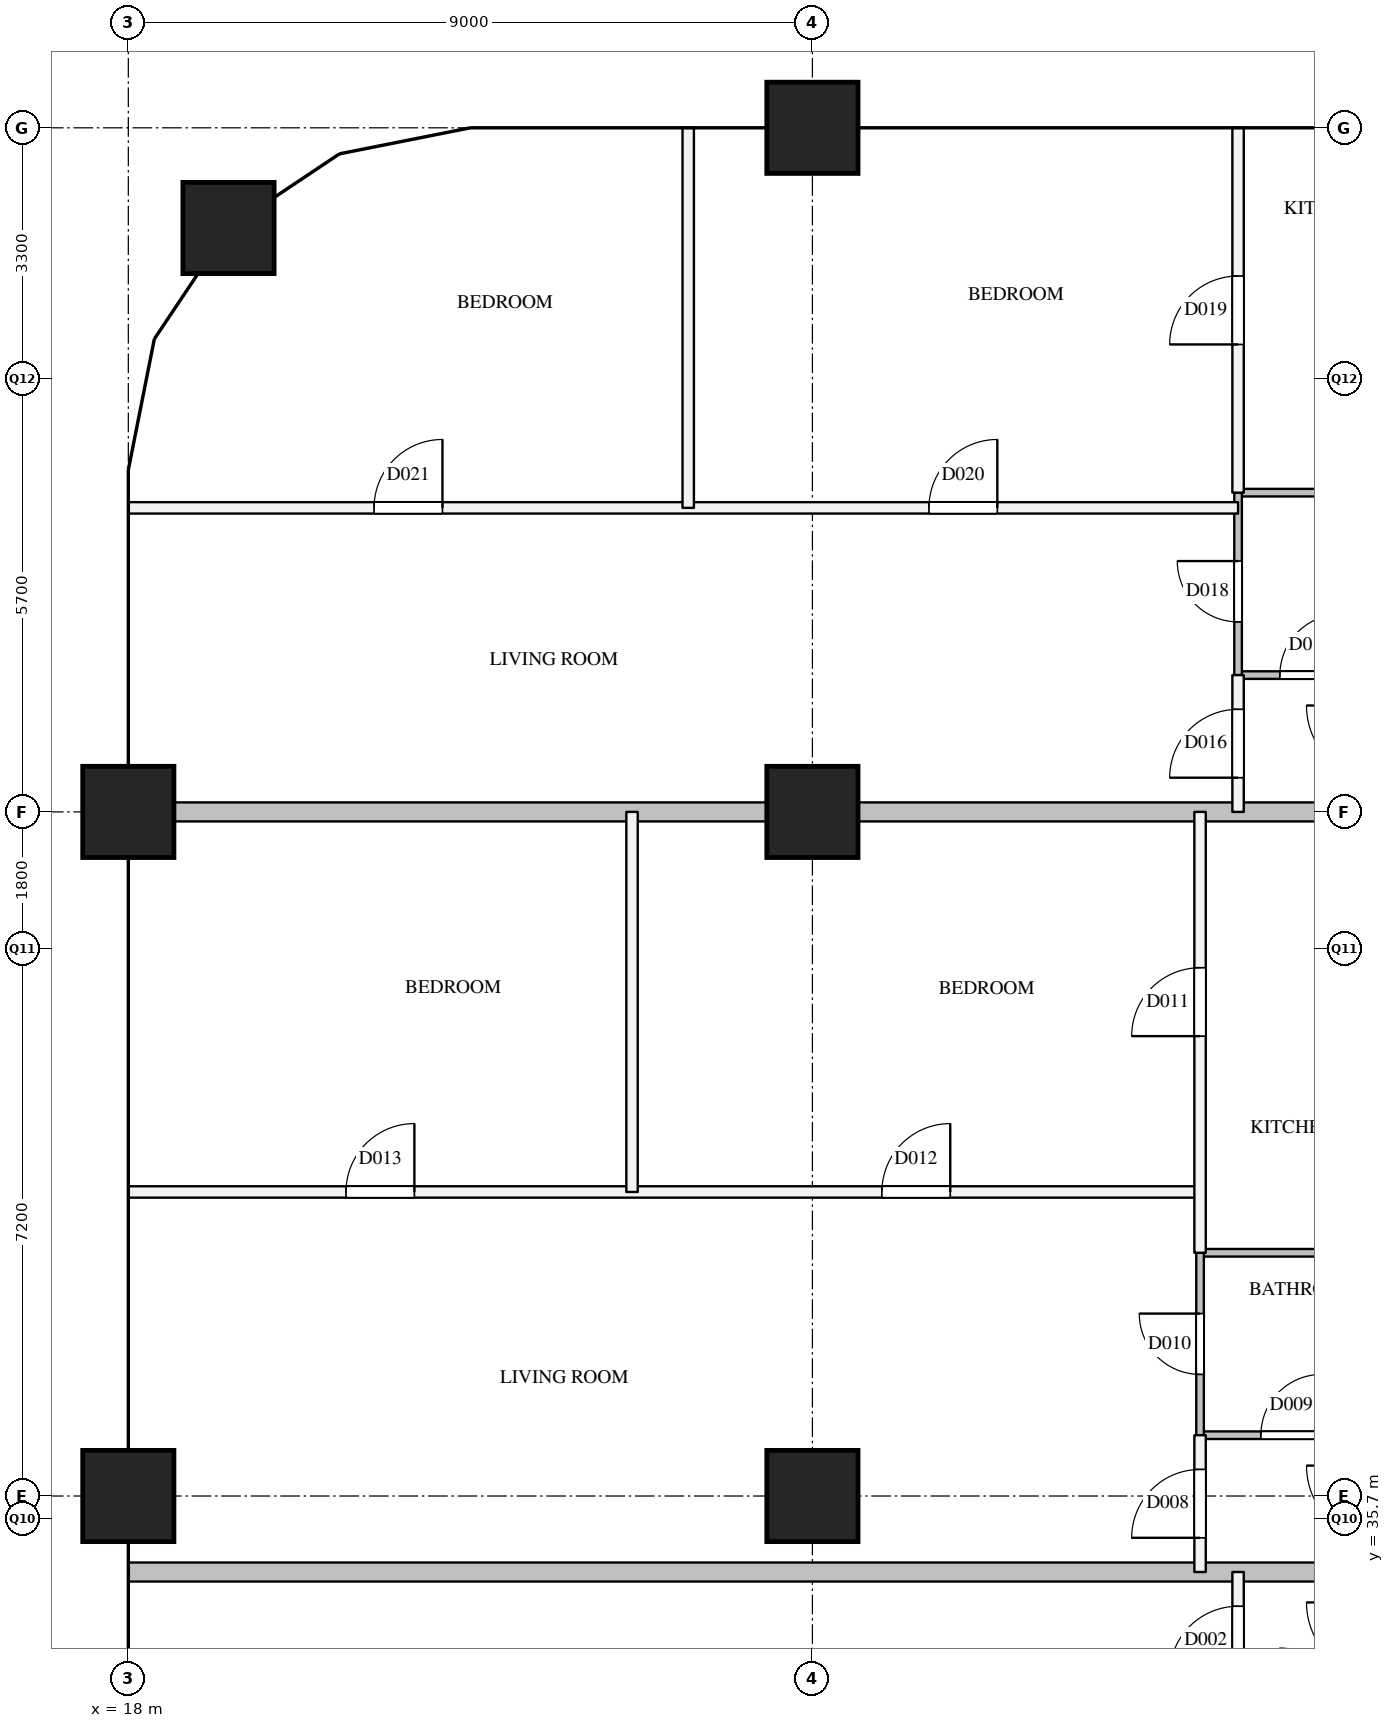
"""IFC4 building model, lengths in metres.
Left out: names, types, materials, properties, quantities, classifications, styles, units other than length and angle.
Written with IfcOpenShell. Run it as: python <this file> out.ifc"""

import sys

from ifc_helpers import new_model, si_unit, direction, frame, frame_2d, origin, origin_2d, place, context, subcontext, project, spatial, rectangle, extrude, element, fill, save


model = new_model("IFC4")
c1 = context("Model", 3, precision=1e-05, world=origin(), true_north=direction((0.0, 1.0)))
c2 = subcontext(c1, "Body", "Model", "MODEL_VIEW")
j1 = project(units=[si_unit("LENGTHUNIT", "METRE"), si_unit("PLANEANGLEUNIT", "RADIAN")], contexts=[c1])
p1 = place(None, origin())
s1 = spatial("IfcSite", under=j1, at=p1, CompositionType="ELEMENT")
p2 = place(p1, origin())
s2 = spatial("IfcBuilding", under=s1, at=p2, CompositionType="ELEMENT")
p3 = place(p2, frame((0.0, 0.0, 242.3)))
s3 = spatial("IfcBuildingStorey", under=s2, at=p3, CompositionType="ELEMENT", Elevation=242.3)
for number, where, z_axis, x_axis in (
    (1, (18.0, 36.0, 0.0), (0.0, 0.0, 1.0), (1.0, 0.0, 0.0)),
    (2, (18.0, 45.0, 0.0), (0.0, 0.0, 1.0), (1.0, 0.0, 0.0)),
    (3, (19.318, 52.682, 0.0), (0.0, 0.0, 1.0), (1.0, 0.0, 0.0)),
    (4, (27.0, 36.0, 0.0), (0.0, 0.0, 1.0), (1.0, 0.0, 0.0)),
    (5, (27.0, 45.0, 0.0), (0.0, 0.0, 1.0), (1.0, 0.0, 0.0)),
    (6, (27.0, 54.0, 0.0), (0.0, 0.0, 1.0), (1.0, 0.0, 0.0)),
):
    element("IfcColumn", number, at=place(p3, frame(where, z_axis=z_axis, x_axis=x_axis)), inside=s3, PredefinedType="COLUMN", context=c2, shape_type="SweptSolid", body=[
        extrude(rectangle(XDim=1.2, YDim=1.2, at=origin_2d()), origin(), (0.0, 0.0, 1.0), 3.9),
    ])
p4 = place(p3, frame((18.0, 40.0, 0.0), z_axis=(0.0, 0.0, 1.0), x_axis=(1.0, 0.0, 0.0)))
e7 = element("IfcWall", 7, at=p4, inside=s3, PredefinedType="PARTITIONING", context=c2, shape_type="SweptSolid", body=[
    extrude(rectangle(XDim=14.1, YDim=0.15, at=frame_2d((7.05, 0.0))), origin(), (0.0, 0.0, 1.0), 2.6),
])
p5 = place(p4, frame((9.914, 0.0, 0.0)))
e8 = element("IfcOpeningElement", 8, at=p5, cuts=e7, PredefinedType="OPENING", context=c2, shape_type="SweptSolid", body=[
    extrude(rectangle(XDim=0.9, YDim=2.1, at=frame_2d((0.45, 1.05))), frame((0.0, 0.085, 0.0), z_axis=(0.0, -1.0, 0.0), x_axis=(1.0, 0.0, 0.0)), (0.0, 0.0, 1.0), 0.17),
])
p6 = place(p4, frame((2.864, 0.0, 0.0)))
e9 = element("IfcOpeningElement", 9, at=p6, cuts=e7, PredefinedType="OPENING", context=c2, shape_type="SweptSolid", body=[
    extrude(rectangle(XDim=0.9, YDim=2.1, at=frame_2d((0.45, 1.05))), frame((0.0, 0.085, 0.0), z_axis=(0.0, -1.0, 0.0), x_axis=(1.0, 0.0, 0.0)), (0.0, 0.0, 1.0), 0.17),
])
p7 = place(p3, frame((18.0, 49.0, 0.0), z_axis=(0.0, 0.0, 1.0), x_axis=(1.0, 0.0, 0.0)))
e10 = element("IfcWall", 10, at=p7, inside=s3, PredefinedType="PARTITIONING", context=c2, shape_type="SweptSolid", body=[
    extrude(rectangle(XDim=14.6, YDim=0.15, at=frame_2d((7.3, 0.0))), origin(), (0.0, 0.0, 1.0), 2.6),
])
p8 = place(p7, frame((10.533, 0.0, 0.0)))
e11 = element("IfcOpeningElement", 11, at=p8, cuts=e10, PredefinedType="OPENING", context=c2, shape_type="SweptSolid", body=[
    extrude(rectangle(XDim=0.9, YDim=2.1, at=frame_2d((0.45, 1.05))), frame((0.0, 0.085, 0.0), z_axis=(0.0, -1.0, 0.0), x_axis=(1.0, 0.0, 0.0)), (0.0, 0.0, 1.0), 0.17),
])
p9 = place(p7, frame((3.233, 0.0, 0.0)))
e12 = element("IfcOpeningElement", 12, at=p9, cuts=e10, PredefinedType="OPENING", context=c2, shape_type="SweptSolid", body=[
    extrude(rectangle(XDim=0.9, YDim=2.1, at=frame_2d((0.45, 1.05))), frame((0.0, 0.085, 0.0), z_axis=(0.0, -1.0, 0.0), x_axis=(1.0, 0.0, 0.0)), (0.0, 0.0, 1.0), 0.17),
])
p10 = place(p3, frame((24.627, 40.0, 0.0), z_axis=(0.0, 0.0, 1.0), x_axis=(0.0, 1.0, 0.0)))
e13 = element("IfcWall", 13, at=p10, inside=s3, PredefinedType="PARTITIONING", context=c2, shape_type="SweptSolid", body=[
    extrude(rectangle(XDim=5.0, YDim=0.15, at=frame_2d((2.5, 0.0))), origin(), (0.0, 0.0, 1.0), 3.6),
])
p11 = place(p3, frame((25.366, 49.0, 0.0), z_axis=(0.0, 0.0, 1.0), x_axis=(0.0, 1.0, 0.0)))
e14 = element("IfcWall", 14, at=p11, inside=s3, PredefinedType="PARTITIONING", context=c2, shape_type="SweptSolid", body=[
    extrude(rectangle(XDim=5.0, YDim=0.15, at=frame_2d((2.5, 0.0))), origin(), (0.0, 0.0, 1.0), 2.6),
])
p12 = place(p3, frame((32.1, 35.0, 0.0), z_axis=(0.0, 0.0, 1.0), x_axis=(0.0, 1.0, 0.0)))
e15 = element("IfcWall", 15, at=p12, inside=s3, PredefinedType="PARTITIONING", context=c2, shape_type="SweptSolid", body=[
    extrude(rectangle(XDim=1.8, YDim=0.15, at=frame_2d((0.9, 0.0))), origin(), (0.0, 0.0, 1.0), 3.6),
])
p13 = place(p12, frame((0.45, 0.0, 0.0)))
e16 = element("IfcOpeningElement", 16, at=p13, cuts=e15, PredefinedType="OPENING", context=c2, shape_type="SweptSolid", body=[
    extrude(rectangle(XDim=0.9, YDim=2.1, at=frame_2d((0.45, 1.05))), frame((0.0, 0.085, 0.0), z_axis=(0.0, -1.0, 0.0), x_axis=(1.0, 0.0, 0.0)), (0.0, 0.0, 1.0), 0.17),
])
p14 = place(p3, frame((32.1, 39.2, 0.0), z_axis=(0.0, 0.0, 1.0), x_axis=(0.0, 1.0, 0.0)))
e17 = element("IfcWall", 17, at=p14, inside=s3, PredefinedType="PARTITIONING", context=c2, shape_type="SweptSolid", body=[
    extrude(rectangle(XDim=5.8, YDim=0.15, at=frame_2d((2.9, 0.0))), origin(), (0.0, 0.0, 1.0), 3.6),
])
p15 = place(p14, frame((2.85, 0.0, 0.0)))
e18 = element("IfcOpeningElement", 18, at=p15, cuts=e17, PredefinedType="OPENING", context=c2, shape_type="SweptSolid", body=[
    extrude(rectangle(XDim=0.9, YDim=2.1, at=frame_2d((0.45, 1.05))), frame((0.0, 0.085, 0.0), z_axis=(0.0, -1.0, 0.0), x_axis=(1.0, 0.0, 0.0)), (0.0, 0.0, 1.0), 0.17),
])
p16 = place(p3, frame((32.6, 33.2, 0.0), z_axis=(0.0, 0.0, 1.0), x_axis=(0.0, 1.0, 0.0)))
e19 = element("IfcWall", 19, at=p16, inside=s3, PredefinedType="PARTITIONING", context=c2, shape_type="SweptSolid", body=[
    extrude(rectangle(XDim=1.8, YDim=0.15, at=frame_2d((0.9, 0.0))), origin(), (0.0, 0.0, 1.0), 3.6),
])
p17 = place(p16, frame((0.45, 0.0, 0.0)))
e20 = element("IfcOpeningElement", 20, at=p17, cuts=e19, PredefinedType="OPENING", context=c2, shape_type="SweptSolid", body=[
    extrude(rectangle(XDim=0.9, YDim=2.1, at=frame_2d((0.45, 1.05))), frame((0.0, 0.085, 0.0), z_axis=(0.0, -1.0, 0.0), x_axis=(1.0, 0.0, 0.0)), (0.0, 0.0, 1.0), 0.17),
])
p18 = place(p3, frame((32.6, 45.0, 0.0), z_axis=(0.0, 0.0, 1.0), x_axis=(0.0, 1.0, 0.0)))
e21 = element("IfcWall", 21, at=p18, inside=s3, PredefinedType="PARTITIONING", context=c2, shape_type="SweptSolid", body=[
    extrude(rectangle(XDim=1.8, YDim=0.15, at=frame_2d((0.9, 0.0))), origin(), (0.0, 0.0, 1.0), 3.6),
])
p19 = place(p18, frame((0.45, 0.0, 0.0)))
e22 = element("IfcOpeningElement", 22, at=p19, cuts=e21, PredefinedType="OPENING", context=c2, shape_type="SweptSolid", body=[
    extrude(rectangle(XDim=0.9, YDim=2.1, at=frame_2d((0.45, 1.05))), frame((0.0, 0.085, 0.0), z_axis=(0.0, -1.0, 0.0), x_axis=(1.0, 0.0, 0.0)), (0.0, 0.0, 1.0), 0.17),
])
p20 = place(p3, frame((32.6, 49.2, 0.0), z_axis=(0.0, 0.0, 1.0), x_axis=(0.0, 1.0, 0.0)))
e23 = element("IfcWall", 23, at=p20, inside=s3, PredefinedType="PARTITIONING", context=c2, shape_type="SweptSolid", body=[
    extrude(rectangle(XDim=4.8, YDim=0.15, at=frame_2d((2.4, 0.0))), origin(), (0.0, 0.0, 1.0), 2.6),
])
p21 = place(p20, frame((1.95, 0.0, 0.0)))
e24 = element("IfcOpeningElement", 24, at=p21, cuts=e23, PredefinedType="OPENING", context=c2, shape_type="SweptSolid", body=[
    extrude(rectangle(XDim=0.9, YDim=2.1, at=frame_2d((0.45, 1.05))), frame((0.0, 0.085, 0.0), z_axis=(0.0, -1.0, 0.0), x_axis=(1.0, 0.0, 0.0)), (0.0, 0.0, 1.0), 0.17),
])
p22 = place(p3, frame((18.0, 35.0, 0.0), z_axis=(0.0, 0.0, 1.0), x_axis=(1.0, 0.0, 0.0)))
e25 = element("IfcWall", 25, at=p22, inside=s3, PredefinedType="PARTITIONING", context=c2, shape_type="SweptSolid", body=[
    extrude(rectangle(XDim=16.5, YDim=0.25, at=frame_2d((8.25, 0.0))), origin(), (0.0, 0.0, 1.0), 2.6),
])
p23 = place(p3, frame((18.0, 45.0, 0.0), z_axis=(0.0, 0.0, 1.0), x_axis=(1.0, 0.0, 0.0)))
e26 = element("IfcWall", 26, at=p23, inside=s3, PredefinedType="PARTITIONING", context=c2, shape_type="SweptSolid", body=[
    extrude(rectangle(XDim=16.5, YDim=0.25, at=frame_2d((8.25, 0.0))), origin(), (0.0, 0.0, 1.0), 3.6),
])
p24 = place(p3, frame((32.1, 36.8, 0.0), z_axis=(0.0, 0.0, 1.0), x_axis=(1.0, 0.0, 0.0)))
e27 = element("IfcWall", 27, at=p24, inside=s3, PredefinedType="PARTITIONING", context=c2, shape_type="SweptSolid", body=[
    extrude(rectangle(XDim=2.4, YDim=0.1, at=frame_2d((1.2, 0.0))), origin(), (0.0, 0.0, 1.0), 3.6),
])
p25 = place(p24, frame((0.8, 0.0, 0.0)))
e28 = element("IfcOpeningElement", 28, at=p25, cuts=e27, PredefinedType="OPENING", context=c2, shape_type="SweptSolid", body=[
    extrude(rectangle(XDim=0.8, YDim=2.1, at=frame_2d((0.4, 1.05))), frame((0.0, 0.06, 0.0), z_axis=(0.0, -1.0, 0.0), x_axis=(1.0, 0.0, 0.0)), (0.0, 0.0, 1.0), 0.12),
])
p26 = place(p3, frame((32.1, 39.2, 0.0), z_axis=(0.0, 0.0, 1.0), x_axis=(1.0, 0.0, 0.0)))
e29 = element("IfcWall", 29, at=p26, inside=s3, PredefinedType="PARTITIONING", context=c2, shape_type="SweptSolid", body=[
    extrude(rectangle(XDim=2.4, YDim=0.1, at=frame_2d((1.2, 0.0))), origin(), (0.0, 0.0, 1.0), 3.6),
])
p27 = place(p3, frame((32.6, 46.8, 0.0), z_axis=(0.0, 0.0, 1.0), x_axis=(1.0, 0.0, 0.0)))
e30 = element("IfcWall", 30, at=p27, inside=s3, PredefinedType="PARTITIONING", context=c2, shape_type="SweptSolid", body=[
    extrude(rectangle(XDim=1.9, YDim=0.1, at=frame_2d((0.95, 0.0))), origin(), (0.0, 0.0, 1.0), 3.6),
])
p28 = place(p27, frame((0.55, 0.0, 0.0)))
e31 = element("IfcOpeningElement", 31, at=p28, cuts=e30, PredefinedType="OPENING", context=c2, shape_type="SweptSolid", body=[
    extrude(rectangle(XDim=0.8, YDim=2.1, at=frame_2d((0.4, 1.05))), frame((0.0, 0.06, 0.0), z_axis=(0.0, -1.0, 0.0), x_axis=(1.0, 0.0, 0.0)), (0.0, 0.0, 1.0), 0.12),
])
p29 = place(p3, frame((32.6, 49.2, 0.0), z_axis=(0.0, 0.0, 1.0), x_axis=(1.0, 0.0, 0.0)))
e32 = element("IfcWall", 32, at=p29, inside=s3, PredefinedType="PARTITIONING", context=c2, shape_type="SweptSolid", body=[
    extrude(rectangle(XDim=1.9, YDim=0.1, at=frame_2d((0.95, 0.0))), origin(), (0.0, 0.0, 1.0), 3.6),
])
p30 = place(p3, frame((32.1, 36.8, 0.0), z_axis=(0.0, 0.0, 1.0), x_axis=(0.0, 1.0, 0.0)))
e33 = element("IfcWall", 33, at=p30, inside=s3, PredefinedType="PARTITIONING", context=c2, shape_type="SweptSolid", body=[
    extrude(rectangle(XDim=2.4, YDim=0.1, at=frame_2d((1.2, 0.0))), origin(), (0.0, 0.0, 1.0), 3.6),
])
p31 = place(p30, frame((0.8, 0.0, 0.0)))
e34 = element("IfcOpeningElement", 34, at=p31, cuts=e33, PredefinedType="OPENING", context=c2, shape_type="SweptSolid", body=[
    extrude(rectangle(XDim=0.8, YDim=2.1, at=frame_2d((0.4, 1.05))), frame((0.0, 0.06, 0.0), z_axis=(0.0, -1.0, 0.0), x_axis=(1.0, 0.0, 0.0)), (0.0, 0.0, 1.0), 0.12),
])
p32 = place(p3, frame((32.6, 46.8, 0.0), z_axis=(0.0, 0.0, 1.0), x_axis=(0.0, 1.0, 0.0)))
e35 = element("IfcWall", 35, at=p32, inside=s3, PredefinedType="PARTITIONING", context=c2, shape_type="SweptSolid", body=[
    extrude(rectangle(XDim=2.4, YDim=0.1, at=frame_2d((1.2, 0.0))), origin(), (0.0, 0.0, 1.0), 3.6),
])
p33 = place(p32, frame((0.7, 0.0, 0.0)))
e36 = element("IfcOpeningElement", 36, at=p33, cuts=e35, PredefinedType="OPENING", context=c2, shape_type="SweptSolid", body=[
    extrude(rectangle(XDim=0.8, YDim=2.1, at=frame_2d((0.4, 1.05))), frame((0.0, 0.06, 0.0), z_axis=(0.0, -1.0, 0.0), x_axis=(1.0, 0.0, 0.0)), (0.0, 0.0, 1.0), 0.12),
])
p34 = place(p17, origin())
e37 = element("IfcDoor", 37, at=p34, inside=s3, OperationType="SINGLE_SWING_LEFT", PredefinedType="DOOR", context=c2, shape_type="SweptSolid", body=[
    extrude(rectangle(XDim=0.9, YDim=2.1, at=frame_2d((0.45, 1.05))), frame((0.0, 0.025, 0.0), z_axis=(0.0, -1.0, 0.0), x_axis=(1.0, 0.0, 0.0)), (0.0, 0.0, 1.0), 0.05),
])
fill(e20, e37)
p35 = place(p13, origin())
e38 = element("IfcDoor", 38, at=p35, inside=s3, OperationType="SINGLE_SWING_LEFT", PredefinedType="DOOR", context=c2, shape_type="SweptSolid", body=[
    extrude(rectangle(XDim=0.9, YDim=2.1, at=frame_2d((0.45, 1.05))), frame((0.0, 0.025, 0.0), z_axis=(0.0, -1.0, 0.0), x_axis=(1.0, 0.0, 0.0)), (0.0, 0.0, 1.0), 0.05),
])
fill(e16, e38)
p36 = place(p25, origin())
e39 = element("IfcDoor", 39, at=p36, inside=s3, OperationType="SINGLE_SWING_RIGHT", PredefinedType="DOOR", context=c2, shape_type="SweptSolid", body=[
    extrude(rectangle(XDim=0.8, YDim=2.1, at=frame_2d((0.4, 1.05))), frame((0.0, 0.025, 0.0), z_axis=(0.0, -1.0, 0.0), x_axis=(1.0, 0.0, 0.0)), (0.0, 0.0, 1.0), 0.05),
])
fill(e28, e39)
p37 = place(p31, origin())
e40 = element("IfcDoor", 40, at=p37, inside=s3, OperationType="SINGLE_SWING_RIGHT", PredefinedType="DOOR", context=c2, shape_type="SweptSolid", body=[
    extrude(rectangle(XDim=0.8, YDim=2.1, at=frame_2d((0.4, 1.05))), frame((0.0, 0.025, 0.0), z_axis=(0.0, -1.0, 0.0), x_axis=(1.0, 0.0, 0.0)), (0.0, 0.0, 1.0), 0.05),
])
fill(e34, e40)
p38 = place(p15, origin())
e41 = element("IfcDoor", 41, at=p38, inside=s3, OperationType="SINGLE_SWING_LEFT", PredefinedType="DOOR", context=c2, shape_type="SweptSolid", body=[
    extrude(rectangle(XDim=0.9, YDim=2.1, at=frame_2d((0.45, 1.05))), frame((0.0, 0.025, 0.0), z_axis=(0.0, -1.0, 0.0), x_axis=(1.0, 0.0, 0.0)), (0.0, 0.0, 1.0), 0.05),
])
fill(e18, e41)
p39 = place(p5, origin())
e42 = element("IfcDoor", 42, at=p39, inside=s3, OperationType="SINGLE_SWING_RIGHT", PredefinedType="DOOR", context=c2, shape_type="SweptSolid", body=[
    extrude(rectangle(XDim=0.9, YDim=2.1, at=frame_2d((0.45, 1.05))), frame((0.0, 0.025, 0.0), z_axis=(0.0, -1.0, 0.0), x_axis=(1.0, 0.0, 0.0)), (0.0, 0.0, 1.0), 0.05),
])
fill(e8, e42)
p40 = place(p6, origin())
e43 = element("IfcDoor", 43, at=p40, inside=s3, OperationType="SINGLE_SWING_RIGHT", PredefinedType="DOOR", context=c2, shape_type="SweptSolid", body=[
    extrude(rectangle(XDim=0.9, YDim=2.1, at=frame_2d((0.45, 1.05))), frame((0.0, 0.025, 0.0), z_axis=(0.0, -1.0, 0.0), x_axis=(1.0, 0.0, 0.0)), (0.0, 0.0, 1.0), 0.05),
])
fill(e9, e43)
p41 = place(p19, origin())
e44 = element("IfcDoor", 44, at=p41, inside=s3, OperationType="SINGLE_SWING_LEFT", PredefinedType="DOOR", context=c2, shape_type="SweptSolid", body=[
    extrude(rectangle(XDim=0.9, YDim=2.1, at=frame_2d((0.45, 1.05))), frame((0.0, 0.025, 0.0), z_axis=(0.0, -1.0, 0.0), x_axis=(1.0, 0.0, 0.0)), (0.0, 0.0, 1.0), 0.05),
])
fill(e22, e44)
p42 = place(p28, origin())
e45 = element("IfcDoor", 45, at=p42, inside=s3, OperationType="SINGLE_SWING_RIGHT", PredefinedType="DOOR", context=c2, shape_type="SweptSolid", body=[
    extrude(rectangle(XDim=0.8, YDim=2.1, at=frame_2d((0.4, 1.05))), frame((0.0, 0.025, 0.0), z_axis=(0.0, -1.0, 0.0), x_axis=(1.0, 0.0, 0.0)), (0.0, 0.0, 1.0), 0.05),
])
fill(e31, e45)
p43 = place(p33, origin())
e46 = element("IfcDoor", 46, at=p43, inside=s3, OperationType="SINGLE_SWING_RIGHT", PredefinedType="DOOR", context=c2, shape_type="SweptSolid", body=[
    extrude(rectangle(XDim=0.8, YDim=2.1, at=frame_2d((0.4, 1.05))), frame((0.0, 0.025, 0.0), z_axis=(0.0, -1.0, 0.0), x_axis=(1.0, 0.0, 0.0)), (0.0, 0.0, 1.0), 0.05),
])
fill(e36, e46)
p44 = place(p21, origin())
e47 = element("IfcDoor", 47, at=p44, inside=s3, OperationType="SINGLE_SWING_LEFT", PredefinedType="DOOR", context=c2, shape_type="SweptSolid", body=[
    extrude(rectangle(XDim=0.9, YDim=2.1, at=frame_2d((0.45, 1.05))), frame((0.0, 0.025, 0.0), z_axis=(0.0, -1.0, 0.0), x_axis=(1.0, 0.0, 0.0)), (0.0, 0.0, 1.0), 0.05),
])
fill(e24, e47)
p45 = place(p8, origin())
e48 = element("IfcDoor", 48, at=p45, inside=s3, OperationType="SINGLE_SWING_RIGHT", PredefinedType="DOOR", context=c2, shape_type="SweptSolid", body=[
    extrude(rectangle(XDim=0.9, YDim=2.1, at=frame_2d((0.45, 1.05))), frame((0.0, 0.025, 0.0), z_axis=(0.0, -1.0, 0.0), x_axis=(1.0, 0.0, 0.0)), (0.0, 0.0, 1.0), 0.05),
])
fill(e11, e48)
p46 = place(p9, origin())
e49 = element("IfcDoor", 49, at=p46, inside=s3, OperationType="SINGLE_SWING_RIGHT", PredefinedType="DOOR", context=c2, shape_type="SweptSolid", body=[
    extrude(rectangle(XDim=0.9, YDim=2.1, at=frame_2d((0.45, 1.05))), frame((0.0, 0.025, 0.0), z_axis=(0.0, -1.0, 0.0), x_axis=(1.0, 0.0, 0.0)), (0.0, 0.0, 1.0), 0.05),
])
fill(e12, e49)
save(model, sys.argv[1])
